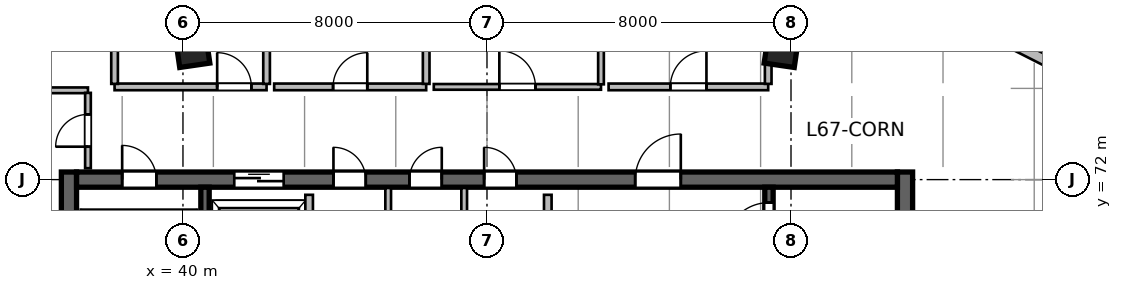
"""IFC4 building model, lengths in metres.
Left out: names, types, materials, properties, quantities, classifications, styles, units other than length and angle.
Written with IfcOpenShell. Run it as: python <this file> out.ifc"""

import sys

from ifc_helpers import new_model, si_unit, direction, frame, frame_2d, origin, origin_2d, place, context, subcontext, project, spatial, rectangle, extrude, source, transform, mapped, element, fill, save


model = new_model("IFC4")
c1 = context("Model", 3, precision=1e-05, world=origin(), true_north=direction((0.0, 1.0)))
c2 = subcontext(c1, "Body", "Model", "MODEL_VIEW")
j1 = project(units=[si_unit("LENGTHUNIT", "METRE"), si_unit("PLANEANGLEUNIT", "RADIAN")], contexts=[c1])
p1 = place(None, origin())
s1 = spatial("IfcSite", under=j1, at=p1, CompositionType="ELEMENT")
p2 = place(p1, origin())
s2 = spatial("IfcBuilding", under=s1, at=p2, CompositionType="ELEMENT")
p3 = place(p2, frame((0.0, 0.0, 275.7)))
s3 = spatial("IfcBuildingStorey", under=s2, at=p3, CompositionType="ELEMENT", Elevation=275.7)
m1 = source(origin(), c2, "Body", "SweptSolid", [
    extrude(rectangle(XDim=12.0, YDim=0.4, at=frame_2d((6.0, 0.0))), origin(), (0.0, 0.0, 1.0), 3.9),
])
for number, where, z_axis, x_axis in (
    (1, (37.0, 60.2, 0.0), (0.0, 0.0, 1.0), (0.0, 1.0, 0.0)),
    (2, (59.0, 60.2, 0.0), (0.0, 0.0, 1.0), (0.0, 1.0, 0.0)),
):
    element("IfcWall", number, at=place(p3, frame(where, z_axis=z_axis, x_axis=x_axis)), inside=s3, PredefinedType="SHEAR", context=c2, shape_type="MappedRepresentation", body=[
        mapped(m1, transform((0.0, 0.0, 0.0), scale=1.0)),
    ])
m2 = source(origin(), c2, "Body", "SweptSolid", [
    extrude(rectangle(XDim=21.6, YDim=0.4, at=frame_2d((10.8, 0.0))), origin(), (0.0, 0.0, 1.0), 3.9),
])
p4 = place(p3, frame((37.2, 72.0, 0.0), z_axis=(0.0, 0.0, 1.0), x_axis=(1.0, 0.0, 0.0)))
e3 = element("IfcWall", 3, at=p4, inside=s3, PredefinedType="SHEAR", context=c2, shape_type="MappedRepresentation", body=[
    mapped(m2, transform((0.0, 0.0, 0.0), scale=1.0)),
])
p5 = place(p4, frame((1.2, 0.0, 0.0)))
e4 = element("IfcOpeningElement", 4, at=p5, cuts=e3, PredefinedType="OPENING", context=c2, shape_type="SweptSolid", body=[
    extrude(rectangle(XDim=0.9, YDim=2.1, at=frame_2d((0.45, 1.05))), frame((0.0, 0.21, 0.0), z_axis=(0.0, -1.0, 0.0), x_axis=(1.0, 0.0, 0.0)), (0.0, 0.0, 1.0), 0.42),
])
p6 = place(p4, frame((14.7, 0.0, 0.0)))
e5 = element("IfcOpeningElement", 5, at=p6, cuts=e3, PredefinedType="OPENING", context=c2, shape_type="SweptSolid", body=[
    extrude(rectangle(XDim=1.2, YDim=2.15, at=frame_2d((0.6, 1.075))), frame((0.0, 0.21, 0.0), z_axis=(0.0, -1.0, 0.0), x_axis=(1.0, 0.0, 0.0)), (0.0, 0.0, 1.0), 0.42),
])
p7 = place(p4, frame((4.15, 0.0, 0.0)))
e6 = element("IfcOpeningElement", 6, at=p7, cuts=e3, PredefinedType="OPENING", context=c2, shape_type="SweptSolid", body=[
    extrude(rectangle(XDim=1.3, YDim=2.15, at=frame_2d((0.65, 1.075))), frame((0.0, 0.21, 0.0), z_axis=(0.0, -1.0, 0.0), x_axis=(1.0, 0.0, 0.0)), (0.0, 0.0, 1.0), 0.42),
])
p8 = place(p4, frame((6.76, 0.0, 0.0)))
e7 = element("IfcOpeningElement", 7, at=p8, cuts=e3, PredefinedType="OPENING", context=c2, shape_type="SweptSolid", body=[
    extrude(rectangle(XDim=0.85, YDim=2.1, at=frame_2d((0.425, 1.05))), frame((0.0, 0.21, 0.0), z_axis=(0.0, -1.0, 0.0), x_axis=(1.0, 0.0, 0.0)), (0.0, 0.0, 1.0), 0.42),
])
p9 = place(p4, frame((8.76, 0.0, 0.0)))
e8 = element("IfcOpeningElement", 8, at=p9, cuts=e3, PredefinedType="OPENING", context=c2, shape_type="SweptSolid", body=[
    extrude(rectangle(XDim=0.85, YDim=2.1, at=frame_2d((0.425, 1.05))), frame((0.0, 0.21, 0.0), z_axis=(0.0, -1.0, 0.0), x_axis=(1.0, 0.0, 0.0)), (0.0, 0.0, 1.0), 0.42),
])
p10 = place(p4, frame((10.725, 0.0, 0.0)))
e9 = element("IfcOpeningElement", 9, at=p10, cuts=e3, PredefinedType="OPENING", context=c2, shape_type="SweptSolid", body=[
    extrude(rectangle(XDim=0.85, YDim=2.1, at=frame_2d((0.425, 1.05))), frame((0.0, 0.21, 0.0), z_axis=(0.0, -1.0, 0.0), x_axis=(1.0, 0.0, 0.0)), (0.0, 0.0, 1.0), 0.42),
])
m3 = source(origin(), c2, "Body", "SweptSolid", [
    extrude(rectangle(XDim=11.2, YDim=0.22, at=frame_2d((5.6, 0.0))), origin(), (0.0, 0.0, 1.0), 3.9),
])
p11 = place(p3, frame((40.58, 60.6, 0.0), z_axis=(0.0, 0.0, 1.0), x_axis=(0.0, 1.0, 0.0)))
e10 = element("IfcWall", 10, at=p11, inside=s3, PredefinedType="SHEAR", context=c2, shape_type="MappedRepresentation", body=[
    mapped(m3, transform((0.0, 0.0, 0.0), scale=1.0)),
])
p12 = place(p3, frame((55.42, 60.6, 0.0), z_axis=(0.0, 0.0, 1.0), x_axis=(0.0, 1.0, 0.0)))
e11 = element("IfcWall", 11, at=p12, inside=s3, PredefinedType="SHEAR", context=c2, shape_type="MappedRepresentation", body=[
    mapped(m3, transform((0.0, 0.0, 0.0), scale=1.0)),
])
p13 = place(p12, frame((9.645, 0.0, 0.0)))
e12 = element("IfcOpeningElement", 12, at=p13, cuts=e11, PredefinedType="OPENING", context=c2, shape_type="SweptSolid", body=[
    extrude(rectangle(XDim=1.15, YDim=2.15, at=frame_2d((0.575, 1.075))), frame((0.0, 0.12, 0.0), z_axis=(0.0, -1.0, 0.0), x_axis=(1.0, 0.0, 0.0)), (0.0, 0.0, 1.0), 0.24),
])
m4 = source(origin(), c2, "Body", "SweptSolid", [
    extrude(rectangle(XDim=0.8, YDim=0.8, at=origin_2d()), origin(), (0.0, 0.0, 1.0), 3.9),
])
for number, where, z_axis, x_axis in (
    (13, (40.253, 75.404, 0.0), (0.0, 0.0, 1.0), (-0.143, 0.99, 0.0)),
    (14, (55.747, 75.404, 0.0), (0.0, 0.0, 1.0), (0.143, 0.99, 0.0)),
):
    element("IfcColumn", number, at=place(p3, frame(where, z_axis=z_axis, x_axis=x_axis)), inside=s3, PredefinedType="COLUMN", context=c2, shape_type="MappedRepresentation", body=[
        mapped(m4, transform((0.0, 0.0, 0.0), scale=1.0)),
    ])
m5 = source(origin(), c2, "Body", "SweptSolid", [
    extrude(rectangle(XDim=2.706, YDim=0.28, at=frame_2d((1.353, 0.0))), origin(), (0.0, 0.0, 1.0), 3.64),
])
p14 = place(p3, frame((61.745, 75.62, 0.0), z_axis=(0.0, 0.0, 1.0), x_axis=(0.891648836287, -0.452727680564, 0.0)))
e15 = element("IfcWall", 15, at=p14, inside=s3, PredefinedType="SOLIDWALL", context=c2, shape_type="MappedRepresentation", body=[
    mapped(m5, transform((0.0, 0.0, 0.0), scale=1.0)),
])
m6 = source(origin(), c2, "Body", "SweptSolid", [
    extrude(rectangle(XDim=5.8, YDim=0.2, at=frame_2d((2.9, 0.0))), origin(), (0.0, 0.0, 1.0), 3.64),
])
p15 = place(p3, frame((49.6, 65.8, 0.0), z_axis=(0.0, 0.0, 1.0), x_axis=(0.0, 1.0, 0.0)))
e16 = element("IfcWall", 16, at=p15, inside=s3, PredefinedType="SOLIDWALL", context=c2, shape_type="MappedRepresentation", body=[
    mapped(m6, transform((0.0, 0.0, 0.0), scale=1.0)),
])
m7 = source(origin(), c2, "Body", "SweptSolid", [
    extrude(rectangle(XDim=3.2, YDim=0.2, at=frame_2d((1.6, 0.0))), origin(), (0.0, 0.0, 1.0), 3.64),
])
p16 = place(p3, frame((43.32, 68.4, 0.0), z_axis=(0.0, 0.0, 1.0), x_axis=(0.0, 1.0, 0.0)))
e17 = element("IfcWall", 17, at=p16, inside=s3, PredefinedType="SOLIDWALL", context=c2, shape_type="MappedRepresentation", body=[
    mapped(m7, transform((0.0, 0.0, 0.0), scale=1.0)),
])
m8 = source(origin(), c2, "Body", "SweptSolid", [
    extrude(rectangle(XDim=3.38, YDim=0.15, at=frame_2d((1.69, 0.0))), origin(), (0.0, 0.0, 1.0), 3.64),
])
for number, where, z_axis, x_axis in (
    (18, (45.4, 68.4, 0.0), (0.0, 0.0, 1.0), (0.0, 1.0, 0.0)),
    (19, (47.4, 68.4, 0.0), (0.0, 0.0, 1.0), (0.0, 1.0, 0.0)),
):
    element("IfcWall", number, at=place(p3, frame(where, z_axis=z_axis, x_axis=x_axis)), inside=s3, PredefinedType="PARTITIONING", context=c2, shape_type="MappedRepresentation", body=[
        mapped(m8, transform((0.0, 0.0, 0.0), scale=1.0)),
    ])
m9 = source(origin(), c2, "Body", "SweptSolid", [
    extrude(rectangle(XDim=3.1, YDim=0.15, at=frame_2d((1.55, 0.0))), origin(), (0.0, 0.0, 1.0), 3.071),
])
p17 = place(p3, frame((34.4, 74.35, 0.0), z_axis=(0.0, 0.0, 1.0), x_axis=(1.0, 0.0, 0.0)))
e20 = element("IfcWall", 20, at=p17, inside=s3, PredefinedType="PARTITIONING", context=c2, shape_type="MappedRepresentation", body=[
    mapped(m9, transform((0.0, 0.0, 0.0), scale=1.0)),
])
m10 = source(origin(), c2, "Body", "SweptSolid", [
    extrude(rectangle(XDim=1.982, YDim=0.15, at=frame_2d((0.991, 0.0))), origin(), (0.0, 0.0, 1.0), 3.64),
])
p18 = place(p3, frame((37.5, 72.3, 0.0), z_axis=(0.0, 0.0, 1.0), x_axis=(0.0, 1.0, 0.0)))
e21 = element("IfcWall", 21, at=p18, inside=s3, PredefinedType="PARTITIONING", context=c2, shape_type="MappedRepresentation", body=[
    mapped(m10, transform((0.0, 0.0, 0.0), scale=1.0)),
])
p19 = place(p18, frame((0.566, 0.0, 0.0)))
e22 = element("IfcOpeningElement", 22, at=p19, cuts=e21, PredefinedType="OPENING", context=c2, shape_type="SweptSolid", body=[
    extrude(rectangle(XDim=0.85, YDim=2.1, at=frame_2d((0.425, 1.05))), frame((0.0, 0.085, 0.0), z_axis=(0.0, -1.0, 0.0), x_axis=(1.0, 0.0, 0.0)), (0.0, 0.0, 1.0), 0.17),
])
m11 = source(origin(), c2, "Body", "SweptSolid", [
    extrude(rectangle(XDim=4.0, YDim=0.175, at=frame_2d((2.0, 0.0))), origin(), (0.0, 0.0, 1.0), 3.64),
])
p20 = place(p3, frame((38.2, 74.44, 0.0), z_axis=(0.0, 0.0, 1.0), x_axis=(1.0, 0.0, 0.0)))
e23 = element("IfcWall", 23, at=p20, inside=s3, PredefinedType="PARTITIONING", context=c2, shape_type="MappedRepresentation", body=[
    mapped(m11, transform((0.0, 0.0, 0.0), scale=1.0)),
])
p21 = place(p20, frame((2.7, 0.0, 0.0)))
e24 = element("IfcOpeningElement", 24, at=p21, cuts=e23, PredefinedType="OPENING", context=c2, shape_type="SweptSolid", body=[
    extrude(rectangle(XDim=0.9, YDim=2.08, at=frame_2d((0.45, 1.04))), frame((0.0, 0.098, 0.0), z_axis=(0.0, -1.0, 0.0), x_axis=(1.0, 0.0, 0.0)), (0.0, 0.0, 1.0), 0.195),
])
m12 = source(origin(), c2, "Body", "SweptSolid", [
    extrude(rectangle(XDim=2.403, YDim=0.175, at=frame_2d((1.201, 0.0))), origin(), (0.0, 0.0, 1.0), 3.64),
])
for number, where, z_axis, x_axis in (
    (25, (38.2, 74.519, 0.0), (0.0, 0.0, 1.0), (0.0, 1.0, 0.0)),
    (26, (42.2, 74.519, 0.0), (0.0, 0.0, 1.0), (0.0, 1.0, 0.0)),
):
    element("IfcWall", number, at=place(p3, frame(where, z_axis=z_axis, x_axis=x_axis)), inside=s3, PredefinedType="PARTITIONING", context=c2, shape_type="MappedRepresentation", body=[
        mapped(m12, transform((0.0, 0.0, 0.0), scale=1.0)),
    ])
p22 = place(p3, frame((42.4, 74.44, 0.0), z_axis=(0.0, 0.0, 1.0), x_axis=(1.0, 0.0, 0.0)))
e27 = element("IfcWall", 27, at=p22, inside=s3, PredefinedType="PARTITIONING", context=c2, shape_type="MappedRepresentation", body=[
    mapped(m11, transform((0.0, 0.0, 0.0), scale=1.0)),
])
p23 = place(p22, frame((1.55, 0.0, 0.0)))
e28 = element("IfcOpeningElement", 28, at=p23, cuts=e27, PredefinedType="OPENING", context=c2, shape_type="SweptSolid", body=[
    extrude(rectangle(XDim=0.9, YDim=2.08, at=frame_2d((0.45, 1.04))), frame((0.0, 0.098, 0.0), z_axis=(0.0, -1.0, 0.0), x_axis=(1.0, 0.0, 0.0)), (0.0, 0.0, 1.0), 0.195),
])
p24 = place(p3, frame((46.4, 74.519, 0.0), z_axis=(0.0, 0.0, 1.0), x_axis=(0.0, 1.0, 0.0)))
e29 = element("IfcWall", 29, at=p24, inside=s3, PredefinedType="PARTITIONING", context=c2, shape_type="MappedRepresentation", body=[
    mapped(m12, transform((0.0, 0.0, 0.0), scale=1.0)),
])
m13 = source(origin(), c2, "Body", "SweptSolid", [
    extrude(rectangle(XDim=4.4, YDim=0.15, at=frame_2d((2.2, 0.0))), origin(), (0.0, 0.0, 1.0), 3.64),
])
p25 = place(p3, frame((46.6, 74.44, 0.0), z_axis=(0.0, 0.0, 1.0), x_axis=(1.0, 0.0, 0.0)))
e30 = element("IfcWall", 30, at=p25, inside=s3, PredefinedType="PARTITIONING", context=c2, shape_type="MappedRepresentation", body=[
    mapped(m13, transform((0.0, 0.0, 0.0), scale=1.0)),
])
p26 = place(p25, frame((1.725, 0.0, 0.0)))
e31 = element("IfcOpeningElement", 31, at=p26, cuts=e30, PredefinedType="OPENING", context=c2, shape_type="SweptSolid", body=[
    extrude(rectangle(XDim=0.95, YDim=2.1, at=frame_2d((0.475, 1.05))), frame((0.0, 0.085, 0.0), z_axis=(0.0, -1.0, 0.0), x_axis=(1.0, 0.0, 0.0)), (0.0, 0.0, 1.0), 0.17),
])
m14 = source(origin(), c2, "Body", "SweptSolid", [
    extrude(rectangle(XDim=2.425, YDim=0.15, at=frame_2d((1.212, 0.0))), origin(), (0.0, 0.0, 1.0), 3.64),
])
p27 = place(p3, frame((51.0, 74.508, 0.0), z_axis=(0.0, 0.0, 1.0), x_axis=(0.0, 1.0, 0.0)))
e32 = element("IfcWall", 32, at=p27, inside=s3, PredefinedType="PARTITIONING", context=c2, shape_type="MappedRepresentation", body=[
    mapped(m14, transform((0.0, 0.0, 0.0), scale=1.0)),
])
m15 = source(origin(), c2, "Body", "SweptSolid", [
    extrude(rectangle(XDim=4.2, YDim=0.175, at=frame_2d((2.1, 0.0))), origin(), (0.0, 0.0, 1.0), 3.64),
])
p28 = place(p3, frame((51.2, 74.44, 0.0), z_axis=(0.0, 0.0, 1.0), x_axis=(1.0, 0.0, 0.0)))
e33 = element("IfcWall", 33, at=p28, inside=s3, PredefinedType="PARTITIONING", context=c2, shape_type="MappedRepresentation", body=[
    mapped(m15, transform((0.0, 0.0, 0.0), scale=1.0)),
])
p29 = place(p28, frame((1.625, 0.0, 0.0)))
e34 = element("IfcOpeningElement", 34, at=p29, cuts=e33, PredefinedType="OPENING", context=c2, shape_type="SweptSolid", body=[
    extrude(rectangle(XDim=0.95, YDim=2.12, at=frame_2d((0.475, 1.06))), frame((0.0, 0.098, 0.0), z_axis=(0.0, -1.0, 0.0), x_axis=(1.0, 0.0, 0.0)), (0.0, 0.0, 1.0), 0.195),
])
p30 = place(p3, frame((55.4, 74.519, 0.0), z_axis=(0.0, 0.0, 1.0), x_axis=(0.0, 1.0, 0.0)))
e35 = element("IfcWall", 35, at=p30, inside=s3, PredefinedType="PARTITIONING", context=c2, shape_type="MappedRepresentation", body=[
    mapped(m12, transform((0.0, 0.0, 0.0), scale=1.0)),
])
m16 = source(origin(), c2, "Body", "SweptSolid", [
    extrude(rectangle(XDim=12.311, YDim=0.15, at=frame_2d((6.155, 0.0))), origin(), (0.0, 0.0, 1.0), 3.64),
])
p31 = place(p3, frame((36.5, 63.216, 0.0), z_axis=(0.0, 0.0, 1.0), x_axis=(-0.268759602651, 0.963207286093, 0.0)))
e36 = element("IfcWall", 36, at=p31, inside=s3, PredefinedType="PARTITIONING", context=c2, shape_type="MappedRepresentation", body=[
    mapped(m16, transform((0.0, 0.0, 0.0), scale=1.0)),
])
m17 = source(origin(), c2, "Body", "SweptSolid", [
    extrude(rectangle(XDim=0.9, YDim=2.1, at=frame_2d((0.45, 1.05))), frame((0.0, 0.025, 0.0), z_axis=(0.0, -1.0, 0.0), x_axis=(1.0, 0.0, 0.0)), (0.0, 0.0, 1.0), 0.05),
])
p32 = place(p5, origin())
e37 = element("IfcDoor", 37, at=p32, inside=s3, OperationType="SINGLE_SWING_LEFT", PredefinedType="DOOR", context=c2, shape_type="MappedRepresentation", body=[
    mapped(m17, transform((0.0, 0.0, 0.0), scale=1.0)),
])
fill(e4, e37)
m18 = source(origin(), c2, "Body", "SweptSolid", [
    extrude(rectangle(XDim=1.15, YDim=2.15, at=frame_2d((0.575, 1.075))), frame((0.0, 0.025, 0.0), z_axis=(0.0, -1.0, 0.0), x_axis=(1.0, 0.0, 0.0)), (0.0, 0.0, 1.0), 0.05),
])
p33 = place(p13, origin())
e38 = element("IfcDoor", 38, at=p33, inside=s3, OperationType="SINGLE_SWING_LEFT", PredefinedType="DOOR", context=c2, shape_type="MappedRepresentation", body=[
    mapped(m18, transform((0.0, 0.0, 0.0), scale=1.0)),
])
fill(e12, e38)
m19 = source(origin(), c2, "Body", "SweptSolid", [
    extrude(rectangle(XDim=1.2, YDim=2.15, at=frame_2d((0.6, 1.075))), frame((0.0, 0.025, 0.0), z_axis=(0.0, -1.0, 0.0), x_axis=(1.0, 0.0, 0.0)), (0.0, 0.0, 1.0), 0.05),
])
p34 = place(p6, origin())
e39 = element("IfcDoor", 39, at=p34, inside=s3, OperationType="SINGLE_SWING_RIGHT", PredefinedType="DOOR", context=c2, shape_type="MappedRepresentation", body=[
    mapped(m19, transform((0.0, 0.0, 0.0), scale=1.0)),
])
fill(e5, e39)
m20 = source(origin(), c2, "Body", "SweptSolid", [
    extrude(rectangle(XDim=1.3, YDim=2.15, at=frame_2d((0.65, 1.075))), frame((0.0, 0.025, 0.0), z_axis=(0.0, -1.0, 0.0), x_axis=(1.0, 0.0, 0.0)), (0.0, 0.0, 1.0), 0.05),
])
p35 = place(p7, origin())
e40 = element("IfcDoor", 40, at=p35, inside=s3, OperationType="DOUBLE_DOOR_SLIDING", PredefinedType="DOOR", context=c2, shape_type="MappedRepresentation", body=[
    mapped(m20, transform((0.0, 0.0, 0.0), scale=1.0)),
])
fill(e6, e40)
m21 = source(origin(), c2, "Body", "SweptSolid", [
    extrude(rectangle(XDim=0.85, YDim=2.1, at=frame_2d((0.425, 1.05))), frame((0.0, 0.025, 0.0), z_axis=(0.0, -1.0, 0.0), x_axis=(1.0, 0.0, 0.0)), (0.0, 0.0, 1.0), 0.05),
])
p36 = place(p8, origin())
e41 = element("IfcDoor", 41, at=p36, inside=s3, OperationType="SINGLE_SWING_LEFT", PredefinedType="DOOR", context=c2, shape_type="MappedRepresentation", body=[
    mapped(m21, transform((0.0, 0.0, 0.0), scale=1.0)),
])
fill(e7, e41)
p37 = place(p9, origin())
e42 = element("IfcDoor", 42, at=p37, inside=s3, OperationType="SINGLE_SWING_RIGHT", PredefinedType="DOOR", context=c2, shape_type="MappedRepresentation", body=[
    mapped(m21, transform((0.0, 0.0, 0.0), scale=1.0)),
])
fill(e8, e42)
p38 = place(p10, origin())
e43 = element("IfcDoor", 43, at=p38, inside=s3, OperationType="SINGLE_SWING_LEFT", PredefinedType="DOOR", context=c2, shape_type="MappedRepresentation", body=[
    mapped(m21, transform((0.0, 0.0, 0.0), scale=1.0)),
])
fill(e9, e43)
p39 = place(p19, origin())
e44 = element("IfcDoor", 44, at=p39, inside=s3, OperationType="SINGLE_SWING_LEFT", PredefinedType="DOOR", context=c2, shape_type="MappedRepresentation", body=[
    mapped(m21, transform((0.0, 0.0, 0.0), scale=1.0)),
])
fill(e22, e44)
m22 = source(origin(), c2, "Body", "SweptSolid", [
    extrude(rectangle(XDim=0.9, YDim=2.08, at=frame_2d((0.45, 1.04))), frame((0.0, 0.025, 0.0), z_axis=(0.0, -1.0, 0.0), x_axis=(1.0, 0.0, 0.0)), (0.0, 0.0, 1.0), 0.05),
])
p40 = place(p21, origin())
e45 = element("IfcDoor", 45, at=p40, inside=s3, OperationType="SINGLE_SWING_LEFT", PredefinedType="DOOR", context=c2, shape_type="MappedRepresentation", body=[
    mapped(m22, transform((0.0, 0.0, 0.0), scale=1.0)),
])
fill(e24, e45)
p41 = place(p23, origin())
e46 = element("IfcDoor", 46, at=p41, inside=s3, OperationType="SINGLE_SWING_RIGHT", PredefinedType="DOOR", context=c2, shape_type="MappedRepresentation", body=[
    mapped(m22, transform((0.0, 0.0, 0.0), scale=1.0)),
])
fill(e28, e46)
m23 = source(origin(), c2, "Body", "SweptSolid", [
    extrude(rectangle(XDim=0.95, YDim=2.1, at=frame_2d((0.475, 1.05))), frame((0.0, 0.025, 0.0), z_axis=(0.0, -1.0, 0.0), x_axis=(1.0, 0.0, 0.0)), (0.0, 0.0, 1.0), 0.05),
])
p42 = place(p26, origin())
e47 = element("IfcDoor", 47, at=p42, inside=s3, OperationType="SINGLE_SWING_LEFT", PredefinedType="DOOR", context=c2, shape_type="MappedRepresentation", body=[
    mapped(m23, transform((0.0, 0.0, 0.0), scale=1.0)),
])
fill(e31, e47)
m24 = source(origin(), c2, "Body", "SweptSolid", [
    extrude(rectangle(XDim=0.95, YDim=2.12, at=frame_2d((0.475, 1.06))), frame((0.0, 0.025, 0.0), z_axis=(0.0, -1.0, 0.0), x_axis=(1.0, 0.0, 0.0)), (0.0, 0.0, 1.0), 0.05),
])
p43 = place(p29, origin())
e48 = element("IfcDoor", 48, at=p43, inside=s3, OperationType="SINGLE_SWING_RIGHT", PredefinedType="DOOR", context=c2, shape_type="MappedRepresentation", body=[
    mapped(m24, transform((0.0, 0.0, 0.0), scale=1.0)),
])
fill(e34, e48)
save(model, sys.argv[1])
